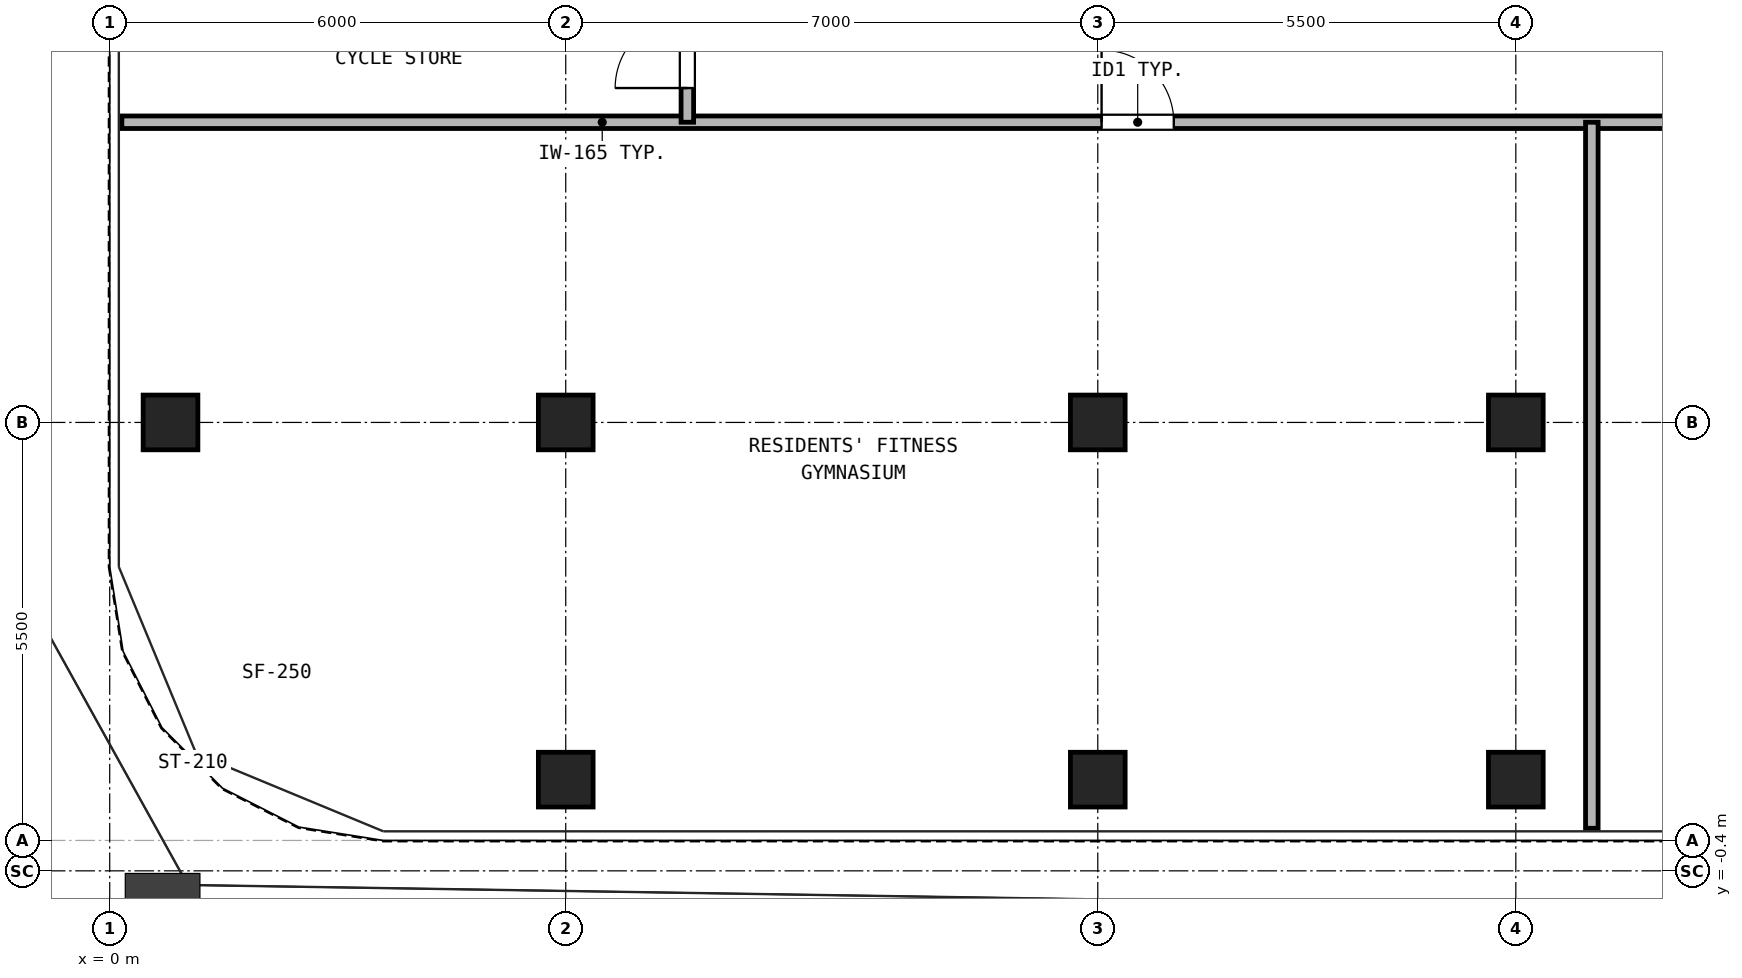
"""IFC4 building model, lengths in metres.
Left out: names, types, materials, properties, quantities, classifications, styles, units other than length and angle.
Written with IfcOpenShell. Run it as: python <this file> out.ifc"""

import sys

from ifc_helpers import new_model, si_unit, direction, frame, frame_2d, origin, origin_2d, place, context, subcontext, project, spatial, rectangle, hollow_rectangle, extrude, source, transform, mapped, element, fill, save


model = new_model("IFC4")
c1 = context("Model", 3, precision=1e-05, world=origin(), true_north=direction((0.0, 1.0)))
c2 = subcontext(c1, "Body", "Model", "MODEL_VIEW")
j1 = project(units=[si_unit("LENGTHUNIT", "METRE"), si_unit("PLANEANGLEUNIT", "RADIAN")], contexts=[c1])
p1 = place(None, origin())
s1 = spatial("IfcSite", under=j1, at=p1, CompositionType="ELEMENT")
p2 = place(p1, origin())
s2 = spatial("IfcBuilding", under=s1, at=p2, CompositionType="ELEMENT")
p3 = place(p2, frame((0.0, 0.0, 172.1)))
s3 = spatial("IfcBuildingStorey", under=s2, at=p3, CompositionType="ELEMENT", Elevation=172.1)
m1 = source(origin(), c2, "Body", "SweptSolid", [
    extrude(hollow_rectangle(XDim=0.72, YDim=0.72, WallThickness=0.04, at=origin_2d()), origin(), (0.0, 0.0, 1.0), 2.95),
])
for number, where, z_axis, x_axis in (
    (1, (6.0, 0.8, 0.0), (0.0, 0.0, 1.0), (1.0, 0.0, 0.0)),
    (2, (13.0, 0.8, 0.0), (0.0, 0.0, 1.0), (1.0, 0.0, 0.0)),
    (3, (18.5, 0.8, 0.0), (0.0, 0.0, 1.0), (1.0, 0.0, 0.0)),
    (4, (0.8, 5.5, 0.0), (0.0, 0.0, 1.0), (1.0, 0.0, 0.0)),
    (5, (6.0, 5.5, 0.0), (0.0, 0.0, 1.0), (1.0, 0.0, 0.0)),
    (6, (13.0, 5.5, 0.0), (0.0, 0.0, 1.0), (1.0, 0.0, 0.0)),
    (7, (18.5, 5.5, 0.0), (0.0, 0.0, 1.0), (1.0, 0.0, 0.0)),
):
    element("IfcColumn", number, at=place(p3, frame(where, z_axis=z_axis, x_axis=x_axis)), inside=s3, PredefinedType="COLUMN", context=c2, shape_type="MappedRepresentation", body=[
        mapped(m1, transform((0.0, 0.0, 0.0), x_axis=(1.0, 0.0, 0.0), y_axis=(0.0, 1.0, 0.0), z_axis=(0.0, 0.0, 1.0), scale=1.0)),
    ])
p4 = place(p3, frame((0.16, 9.45, 0.0), z_axis=(0.0, 0.0, 1.0), x_axis=(1.0, 0.0, 0.0)))
e8 = element("IfcWall", 8, at=p4, inside=s3, PredefinedType="PARTITIONING", context=c2, shape_type="SweptSolid", body=[
    extrude(rectangle(XDim=41.48, YDim=0.165, at=frame_2d((20.74, 0.0))), origin(), (0.0, 0.0, 1.0), 2.95),
])
p5 = place(p4, frame((12.89, 0.0, 0.0)))
e9 = element("IfcOpeningElement", 9, at=p5, cuts=e8, PredefinedType="OPENING", context=c2, shape_type="SweptSolid", body=[
    extrude(rectangle(XDim=0.95, YDim=2.15, at=frame_2d((0.475, 1.075))), frame((0.0, 0.093, 0.0), z_axis=(0.0, -1.0, 0.0), x_axis=(1.0, 0.0, 0.0)), (0.0, 0.0, 1.0), 0.185),
])
p6 = place(p4, frame((23.34, 0.0, 0.0)))
e10 = element("IfcOpeningElement", 10, at=p6, cuts=e8, PredefinedType="OPENING", context=c2, shape_type="SweptSolid", body=[
    extrude(rectangle(XDim=0.95, YDim=2.15, at=frame_2d((0.475, 1.075))), frame((0.0, 0.093, 0.0), z_axis=(0.0, -1.0, 0.0), x_axis=(1.0, 0.0, 0.0)), (0.0, 0.0, 1.0), 0.185),
])
p7 = place(p4, frame((30.34, 0.0, 0.0)))
e11 = element("IfcOpeningElement", 11, at=p7, cuts=e8, PredefinedType="OPENING", context=c2, shape_type="SweptSolid", body=[
    extrude(rectangle(XDim=0.95, YDim=2.15, at=frame_2d((0.475, 1.075))), frame((0.0, 0.093, 0.0), z_axis=(0.0, -1.0, 0.0), x_axis=(1.0, 0.0, 0.0)), (0.0, 0.0, 1.0), 0.185),
])
p8 = place(p4, frame((35.19, 0.0, 0.0)))
e12 = element("IfcOpeningElement", 12, at=p8, cuts=e8, PredefinedType="OPENING", context=c2, shape_type="SweptSolid", body=[
    extrude(rectangle(XDim=0.95, YDim=2.15, at=frame_2d((0.475, 1.075))), frame((0.0, 0.093, 0.0), z_axis=(0.0, -1.0, 0.0), x_axis=(1.0, 0.0, 0.0)), (0.0, 0.0, 1.0), 0.185),
])
p9 = place(p3, frame((7.6, 9.45, 0.0), z_axis=(0.0, 0.0, 1.0), x_axis=(0.0, 1.0, 0.0)))
e13 = element("IfcWall", 13, at=p9, inside=s3, PredefinedType="PARTITIONING", context=c2, shape_type="SweptSolid", body=[
    extrude(rectangle(XDim=2.0, YDim=0.165, at=frame_2d((1.0, 0.0))), origin(), (0.0, 0.0, 1.0), 2.95),
])
p10 = place(p9, frame((0.45, 0.0, 0.0)))
e14 = element("IfcOpeningElement", 14, at=p10, cuts=e13, PredefinedType="OPENING", context=c2, shape_type="SweptSolid", body=[
    extrude(rectangle(XDim=0.95, YDim=2.15, at=frame_2d((0.475, 1.075))), frame((0.0, 0.093, 0.0), z_axis=(0.0, -1.0, 0.0), x_axis=(1.0, 0.0, 0.0)), (0.0, 0.0, 1.0), 0.185),
])
p11 = place(p3, frame((19.5, 0.16, 0.0), z_axis=(0.0, 0.0, 1.0), x_axis=(0.0, 1.0, 0.0)))
e15 = element("IfcWall", 15, at=p11, inside=s3, PredefinedType="PARTITIONING", context=c2, shape_type="SweptSolid", body=[
    extrude(rectangle(XDim=9.29, YDim=0.165, at=frame_2d((4.645, 0.0))), origin(), (0.0, 0.0, 1.0), 2.95),
])
p12 = place(p5, frame((0.95, 0.0, 0.0), z_axis=(0.0, 0.0, 1.0), x_axis=(-1.0, 0.0, 0.0)))
e16 = element("IfcDoor", 16, at=p12, inside=s3, OperationType="SINGLE_SWING_LEFT", PredefinedType="DOOR", context=c2, shape_type="SweptSolid", body=[
    extrude(rectangle(XDim=0.95, YDim=2.15, at=frame_2d((0.475, 1.075))), frame((0.0, 0.025, 0.0), z_axis=(0.0, -1.0, 0.0), x_axis=(1.0, 0.0, 0.0)), (0.0, 0.0, 1.0), 0.05),
])
fill(e9, e16)
p13 = place(p10, frame((0.95, 0.0, 0.0), z_axis=(0.0, 0.0, 1.0), x_axis=(-1.0, 0.0, 0.0)))
e17 = element("IfcDoor", 17, at=p13, inside=s3, OperationType="SINGLE_SWING_LEFT", PredefinedType="DOOR", context=c2, shape_type="SweptSolid", body=[
    extrude(rectangle(XDim=0.95, YDim=2.15, at=frame_2d((0.475, 1.075))), frame((0.0, 0.025, 0.0), z_axis=(0.0, -1.0, 0.0), x_axis=(1.0, 0.0, 0.0)), (0.0, 0.0, 1.0), 0.05),
])
fill(e14, e17)
save(model, sys.argv[1])
